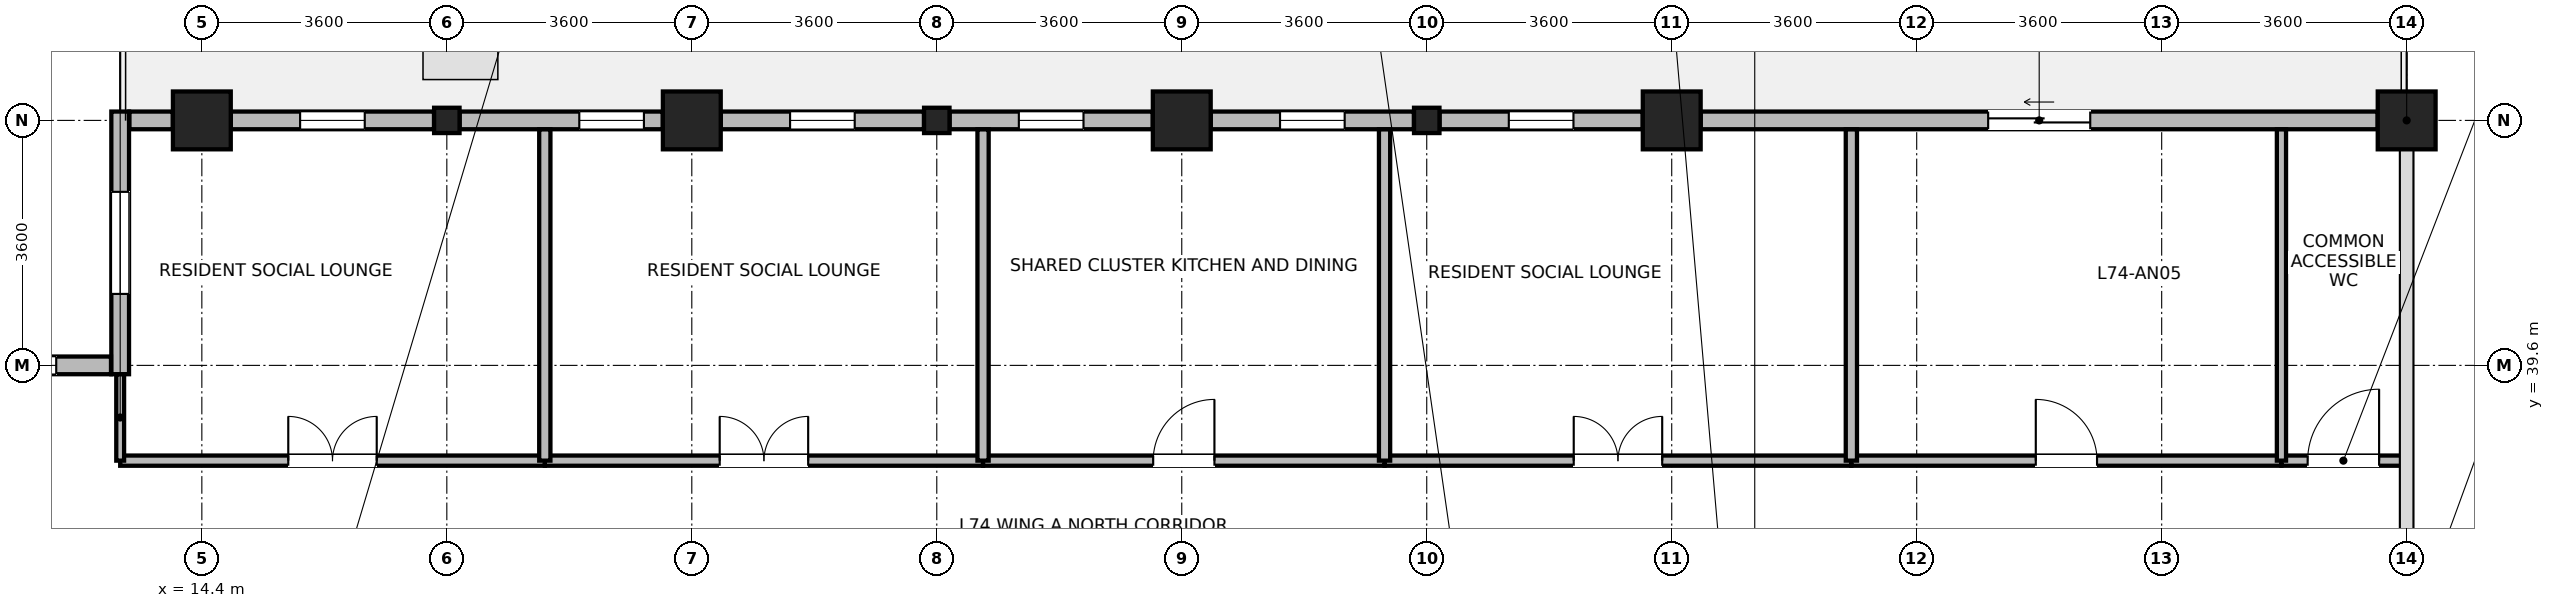
"""IFC4 building model, lengths in metres.
Left out: names, types, materials, properties, quantities, classifications, styles, units other than length and angle.
Written with IfcOpenShell. Run it as: python <this file> out.ifc"""

import sys

from ifc_helpers import new_model, si_unit, direction, frame, frame_2d, origin, origin_2d, place, context, subcontext, project, spatial, rectangle, i_section, extrude, source, transform, mapped, element, fill, save


model = new_model("IFC4")
c1 = context("Model", 3, precision=1e-05, world=origin(), true_north=direction((0.0, 1.0)))
c2 = subcontext(c1, "Body", "Model", "MODEL_VIEW")
j1 = project(units=[si_unit("LENGTHUNIT", "METRE"), si_unit("PLANEANGLEUNIT", "RADIAN")], contexts=[c1])
p1 = place(None, origin())
s1 = spatial("IfcSite", under=j1, at=p1, CompositionType="ELEMENT")
p2 = place(p1, origin())
s2 = spatial("IfcBuilding", under=s1, at=p2, CompositionType="ELEMENT")
p3 = place(p2, frame((0.0, 0.0, 286.9)))
s3 = spatial("IfcBuildingStorey", under=s2, at=p3, CompositionType="ELEMENT", Elevation=286.9)
m1 = source(origin(), c2, "Body", "SweptSolid", [
    extrude(rectangle(XDim=0.85, YDim=0.85, at=origin_2d()), origin(), (0.0, 0.0, 1.0), 3.7),
])
for number, where, z_axis, x_axis in (
    (1, (14.4, 43.2, 0.0), (0.0, 0.0, 1.0), (1.0, 0.0, 0.0)),
    (2, (21.6, 43.2, 0.0), (0.0, 0.0, 1.0), (1.0, 0.0, 0.0)),
    (3, (28.8, 43.2, 0.0), (0.0, 0.0, 1.0), (1.0, 0.0, 0.0)),
    (4, (36.0, 43.2, 0.0), (0.0, 0.0, 1.0), (1.0, 0.0, 0.0)),
    (5, (46.8, 43.2, 0.0), (0.0, 0.0, 1.0), (1.0, 0.0, 0.0)),
):
    element("IfcColumn", number, at=place(p3, frame(where, z_axis=z_axis, x_axis=x_axis)), inside=s3, PredefinedType="COLUMN", context=c2, shape_type="MappedRepresentation", body=[
        mapped(m1, transform((0.0, 0.0, 0.0), x_axis=(1.0, 0.0, 0.0), y_axis=(0.0, 1.0, 0.0), z_axis=(0.0, 0.0, 1.0), scale=1.0)),
    ])
m2 = source(origin(), c2, "Body", "SweptSolid", [
    extrude(i_section(OverallWidth=0.374, OverallDepth=0.372, WebThickness=0.015, FlangeThickness=0.026, FilletRadius=0.015, at=origin_2d()), origin(), (0.0, 0.0, 1.0), 3.7),
])
for number, where, z_axis, x_axis in (
    (6, (18.0, 43.2, 0.0), (0.0, 0.0, 1.0), (1.0, 0.0, 0.0)),
    (7, (25.2, 43.2, 0.0), (0.0, 0.0, 1.0), (1.0, 0.0, 0.0)),
    (8, (32.4, 43.2, 0.0), (0.0, 0.0, 1.0), (1.0, 0.0, 0.0)),
):
    element("IfcColumn", number, at=place(p3, frame(where, z_axis=z_axis, x_axis=x_axis)), inside=s3, PredefinedType="COLUMN", context=c2, shape_type="MappedRepresentation", body=[
        mapped(m2, transform((0.0, 0.0, 0.0), x_axis=(1.0, 0.0, 0.0), y_axis=(0.0, 1.0, 0.0), z_axis=(0.0, 0.0, 1.0), scale=1.0)),
    ])
p4 = place(p3, frame((36.426, 43.2, 0.0), z_axis=(0.0, 0.0, 1.0), x_axis=(1.0, 0.0, 0.0)))
e9 = element("IfcWall", 9, at=p4, inside=s3, PredefinedType="STANDARD", context=c2, shape_type="SweptSolid", body=[
    extrude(rectangle(XDim=9.948, YDim=0.26, at=frame_2d((4.974, 0.0))), origin(), (0.0, 0.0, 1.0), 3.055),
])
p5 = place(p4, frame((4.224, 0.0, 0.0)))
e10 = element("IfcOpeningElement", 10, at=p5, cuts=e9, PredefinedType="OPENING", context=c2, shape_type="SweptSolid", body=[
    extrude(rectangle(XDim=1.5, YDim=2.15, at=frame_2d((0.75, 1.075))), frame((0.0, 0.14, 0.0), z_axis=(0.0, -1.0, 0.0), x_axis=(1.0, 0.0, 0.0)), (0.0, 0.0, 1.0), 0.28),
])
p6 = place(p3, frame((32.588, 43.2, 0.0), z_axis=(0.0, 0.0, 1.0), x_axis=(1.0, 0.0, 0.0)))
e11 = element("IfcWall", 11, at=p6, inside=s3, PredefinedType="STANDARD", context=c2, shape_type="SweptSolid", body=[
    extrude(rectangle(XDim=2.986, YDim=0.26, at=frame_2d((1.493, 0.0))), origin(), (0.0, 0.0, 1.0), 3.055),
])
p7 = place(p6, frame((1.018, 0.0, 0.85)))
e12 = element("IfcOpeningElement", 12, at=p7, cuts=e11, PredefinedType="OPENING", context=c2, shape_type="SweptSolid", body=[
    extrude(rectangle(XDim=0.95, YDim=1.75, at=frame_2d((0.475, 0.875))), frame((0.0, 0.14, 0.0), z_axis=(0.0, -1.0, 0.0), x_axis=(1.0, 0.0, 0.0)), (0.0, 0.0, 1.0), 0.28),
])
p8 = place(p3, frame((29.226, 43.2, 0.0), z_axis=(0.0, 0.0, 1.0), x_axis=(1.0, 0.0, 0.0)))
e13 = element("IfcWall", 13, at=p8, inside=s3, PredefinedType="STANDARD", context=c2, shape_type="SweptSolid", body=[
    extrude(rectangle(XDim=2.986, YDim=0.26, at=frame_2d((1.493, 0.0))), origin(), (0.0, 0.0, 1.0), 3.055),
])
p9 = place(p8, frame((1.018, 0.0, 0.85)))
e14 = element("IfcOpeningElement", 14, at=p9, cuts=e13, PredefinedType="OPENING", context=c2, shape_type="SweptSolid", body=[
    extrude(rectangle(XDim=0.95, YDim=1.75, at=frame_2d((0.475, 0.875))), frame((0.0, 0.14, 0.0), z_axis=(0.0, -1.0, 0.0), x_axis=(1.0, 0.0, 0.0)), (0.0, 0.0, 1.0), 0.28),
])
p10 = place(p3, frame((25.388, 43.2, 0.0), z_axis=(0.0, 0.0, 1.0), x_axis=(1.0, 0.0, 0.0)))
e15 = element("IfcWall", 15, at=p10, inside=s3, PredefinedType="STANDARD", context=c2, shape_type="SweptSolid", body=[
    extrude(rectangle(XDim=2.986, YDim=0.26, at=frame_2d((1.493, 0.0))), origin(), (0.0, 0.0, 1.0), 3.055),
])
p11 = place(p10, frame((1.018, 0.0, 0.85)))
e16 = element("IfcOpeningElement", 16, at=p11, cuts=e15, PredefinedType="OPENING", context=c2, shape_type="SweptSolid", body=[
    extrude(rectangle(XDim=0.95, YDim=1.75, at=frame_2d((0.475, 0.875))), frame((0.0, 0.14, 0.0), z_axis=(0.0, -1.0, 0.0), x_axis=(1.0, 0.0, 0.0)), (0.0, 0.0, 1.0), 0.28),
])
p12 = place(p3, frame((22.026, 43.2, 0.0), z_axis=(0.0, 0.0, 1.0), x_axis=(1.0, 0.0, 0.0)))
e17 = element("IfcWall", 17, at=p12, inside=s3, PredefinedType="STANDARD", context=c2, shape_type="SweptSolid", body=[
    extrude(rectangle(XDim=2.986, YDim=0.26, at=frame_2d((1.493, 0.0))), origin(), (0.0, 0.0, 1.0), 3.055),
])
p13 = place(p12, frame((1.018, 0.0, 0.85)))
e18 = element("IfcOpeningElement", 18, at=p13, cuts=e17, PredefinedType="OPENING", context=c2, shape_type="SweptSolid", body=[
    extrude(rectangle(XDim=0.95, YDim=1.75, at=frame_2d((0.475, 0.875))), frame((0.0, 0.14, 0.0), z_axis=(0.0, -1.0, 0.0), x_axis=(1.0, 0.0, 0.0)), (0.0, 0.0, 1.0), 0.28),
])
p14 = place(p3, frame((18.188, 43.2, 0.0), z_axis=(0.0, 0.0, 1.0), x_axis=(1.0, 0.0, 0.0)))
e19 = element("IfcWall", 19, at=p14, inside=s3, PredefinedType="STANDARD", context=c2, shape_type="SweptSolid", body=[
    extrude(rectangle(XDim=2.986, YDim=0.26, at=frame_2d((1.493, 0.0))), origin(), (0.0, 0.0, 1.0), 3.055),
])
p15 = place(p14, frame((1.759, 0.0, 0.85)))
e20 = element("IfcOpeningElement", 20, at=p15, cuts=e19, PredefinedType="OPENING", context=c2, shape_type="SweptSolid", body=[
    extrude(rectangle(XDim=0.95, YDim=1.75, at=frame_2d((0.475, 0.875))), frame((0.0, 0.14, 0.0), z_axis=(0.0, -1.0, 0.0), x_axis=(1.0, 0.0, 0.0)), (0.0, 0.0, 1.0), 0.28),
])
p16 = place(p3, frame((14.826, 43.2, 0.0), z_axis=(0.0, 0.0, 1.0), x_axis=(1.0, 0.0, 0.0)))
e21 = element("IfcWall", 21, at=p16, inside=s3, PredefinedType="STANDARD", context=c2, shape_type="SweptSolid", body=[
    extrude(rectangle(XDim=2.986, YDim=0.26, at=frame_2d((1.493, 0.0))), origin(), (0.0, 0.0, 1.0), 3.055),
])
p17 = place(p16, frame((1.018, 0.0, 0.85)))
e22 = element("IfcOpeningElement", 22, at=p17, cuts=e21, PredefinedType="OPENING", context=c2, shape_type="SweptSolid", body=[
    extrude(rectangle(XDim=0.95, YDim=1.75, at=frame_2d((0.475, 0.875))), frame((0.0, 0.14, 0.0), z_axis=(0.0, -1.0, 0.0), x_axis=(1.0, 0.0, 0.0)), (0.0, 0.0, 1.0), 0.28),
])
p18 = place(p3, frame((13.335, 43.2, 0.0), z_axis=(0.0, 0.0, 1.0), x_axis=(1.0, 0.0, 0.0)))
e23 = element("IfcWall", 23, at=p18, inside=s3, PredefinedType="STANDARD", context=c2, shape_type="SweptSolid", body=[
    extrude(rectangle(XDim=0.639, YDim=0.26, at=frame_2d((0.32, 0.0))), origin(), (0.0, 0.0, 1.0), 3.455),
])
p19 = place(p3, frame((13.2, 39.47, 0.0), z_axis=(0.0, 0.0, 1.0), x_axis=(0.0, 1.0, 0.0)))
e24 = element("IfcWall", 24, at=p19, inside=s3, PredefinedType="STANDARD", context=c2, shape_type="SweptSolid", body=[
    extrude(rectangle(XDim=3.86, YDim=0.26, at=frame_2d((1.93, 0.0))), origin(), (0.0, 0.0, 1.0), 3.455),
])
p20 = place(p19, frame((1.18, 0.0, 0.85)))
e25 = element("IfcOpeningElement", 25, at=p20, cuts=e24, PredefinedType="OPENING", context=c2, shape_type="SweptSolid", body=[
    extrude(rectangle(XDim=1.5, YDim=1.85, at=frame_2d((0.75, 0.925))), frame((0.0, 0.14, 0.0), z_axis=(0.0, -1.0, 0.0), x_axis=(1.0, 0.0, 0.0)), (0.0, 0.0, 1.0), 0.28),
])
p21 = place(p3, frame((3.735, 39.6, 0.0), z_axis=(0.0, 0.0, 1.0), x_axis=(1.0, 0.0, 0.0)))
e26 = element("IfcWall", 26, at=p21, inside=s3, PredefinedType="STANDARD", context=c2, shape_type="SweptSolid", body=[
    extrude(rectangle(XDim=9.33, YDim=0.26, at=frame_2d((4.665, 0.0))), origin(), (0.0, 0.0, 1.0), 3.455),
])
p22 = place(p21, frame((0.805, 0.0, 0.85)))
e27 = element("IfcOpeningElement", 27, at=p22, cuts=e26, PredefinedType="OPENING", context=c2, shape_type="SweptSolid", body=[
    extrude(rectangle(XDim=1.5, YDim=1.85, at=frame_2d((0.75, 0.925))), frame((0.0, 0.14, 0.0), z_axis=(0.0, -1.0, 0.0), x_axis=(1.0, 0.0, 0.0)), (0.0, 0.0, 1.0), 0.28),
])
p23 = place(p21, frame((3.915, 0.0, 0.85)))
e28 = element("IfcOpeningElement", 28, at=p23, cuts=e26, PredefinedType="OPENING", context=c2, shape_type="SweptSolid", body=[
    extrude(rectangle(XDim=1.5, YDim=1.85, at=frame_2d((0.75, 0.925))), frame((0.0, 0.14, 0.0), z_axis=(0.0, -1.0, 0.0), x_axis=(1.0, 0.0, 0.0)), (0.0, 0.0, 1.0), 0.28),
])
p24 = place(p21, frame((7.025, 0.0, 0.85)))
e29 = element("IfcOpeningElement", 29, at=p24, cuts=e26, PredefinedType="OPENING", context=c2, shape_type="SweptSolid", body=[
    extrude(rectangle(XDim=1.5, YDim=1.85, at=frame_2d((0.75, 0.925))), frame((0.0, 0.14, 0.0), z_axis=(0.0, -1.0, 0.0), x_axis=(1.0, 0.0, 0.0)), (0.0, 0.0, 1.0), 0.28),
])
p25 = place(p3, frame((31.78, 38.2, 0.0), z_axis=(0.0, 0.0, 1.0), x_axis=(1.0, 0.0, 0.0)))
e30 = element("IfcWall", 30, at=p25, inside=s3, PredefinedType="PARTITIONING", context=c2, shape_type="SweptSolid", body=[
    extrude(rectangle(XDim=6.86, YDim=0.15, at=frame_2d((3.43, 0.0))), origin(), (0.0, 0.0, 1.0), 3.455),
])
p26 = place(p25, frame((2.78, 0.0, 0.0)))
e31 = element("IfcOpeningElement", 31, at=p26, cuts=e30, PredefinedType="OPENING", context=c2, shape_type="SweptSolid", body=[
    extrude(rectangle(XDim=1.3, YDim=2.12, at=frame_2d((0.65, 1.06))), frame((0.0, 0.085, 0.0), z_axis=(0.0, -1.0, 0.0), x_axis=(1.0, 0.0, 0.0)), (0.0, 0.0, 1.0), 0.17),
])
p27 = place(p3, frame((19.44, 38.2, 0.0), z_axis=(0.0, 0.0, 1.0), x_axis=(1.0, 0.0, 0.0)))
e32 = element("IfcWall", 32, at=p27, inside=s3, PredefinedType="PARTITIONING", context=c2, shape_type="SweptSolid", body=[
    extrude(rectangle(XDim=6.44, YDim=0.15, at=frame_2d((3.22, 0.0))), origin(), (0.0, 0.0, 1.0), 3.455),
])
p28 = place(p27, frame((2.57, 0.0, 0.0)))
e33 = element("IfcOpeningElement", 33, at=p28, cuts=e32, PredefinedType="OPENING", context=c2, shape_type="SweptSolid", body=[
    extrude(rectangle(XDim=1.3, YDim=2.12, at=frame_2d((0.65, 1.06))), frame((0.0, 0.085, 0.0), z_axis=(0.0, -1.0, 0.0), x_axis=(1.0, 0.0, 0.0)), (0.0, 0.0, 1.0), 0.17),
])
p29 = place(p3, frame((38.64, 38.2, 0.0), z_axis=(0.0, 0.0, 1.0), x_axis=(1.0, 0.0, 0.0)))
e34 = element("IfcWall", 34, at=p29, inside=s3, PredefinedType="PARTITIONING", context=c2, shape_type="SweptSolid", body=[
    extrude(rectangle(XDim=6.32, YDim=0.15, at=frame_2d((3.16, 0.0))), origin(), (0.0, 0.0, 1.0), 3.455),
])
p30 = place(p29, frame((2.71, 0.0, 0.0)))
e35 = element("IfcOpeningElement", 35, at=p30, cuts=e34, PredefinedType="OPENING", context=c2, shape_type="SweptSolid", body=[
    extrude(rectangle(XDim=0.9, YDim=2.08, at=frame_2d((0.45, 1.04))), frame((0.0, 0.085, 0.0), z_axis=(0.0, -1.0, 0.0), x_axis=(1.0, 0.0, 0.0)), (0.0, 0.0, 1.0), 0.17),
])
p31 = place(p3, frame((13.2, 38.2, 0.0), z_axis=(0.0, 0.0, 1.0), x_axis=(1.0, 0.0, 0.0)))
e36 = element("IfcWall", 36, at=p31, inside=s3, PredefinedType="PARTITIONING", context=c2, shape_type="SweptSolid", body=[
    extrude(rectangle(XDim=6.24, YDim=0.15, at=frame_2d((3.12, 0.0))), origin(), (0.0, 0.0, 1.0), 3.455),
])
p32 = place(p31, frame((2.47, 0.0, 0.0)))
e37 = element("IfcOpeningElement", 37, at=p32, cuts=e36, PredefinedType="OPENING", context=c2, shape_type="SweptSolid", body=[
    extrude(rectangle(XDim=1.3, YDim=2.12, at=frame_2d((0.65, 1.06))), frame((0.0, 0.085, 0.0), z_axis=(0.0, -1.0, 0.0), x_axis=(1.0, 0.0, 0.0)), (0.0, 0.0, 1.0), 0.17),
])
p33 = place(p3, frame((25.88, 38.2, 0.0), z_axis=(0.0, 0.0, 1.0), x_axis=(1.0, 0.0, 0.0)))
e38 = element("IfcWall", 38, at=p33, inside=s3, PredefinedType="PARTITIONING", context=c2, shape_type="SweptSolid", body=[
    extrude(rectangle(XDim=5.9, YDim=0.15, at=frame_2d((2.95, 0.0))), origin(), (0.0, 0.0, 1.0), 3.455),
])
p34 = place(p33, frame((2.5, 0.0, 0.0)))
e39 = element("IfcOpeningElement", 39, at=p34, cuts=e38, PredefinedType="OPENING", context=c2, shape_type="SweptSolid", body=[
    extrude(rectangle(XDim=0.9, YDim=2.08, at=frame_2d((0.45, 1.04))), frame((0.0, 0.085, 0.0), z_axis=(0.0, -1.0, 0.0), x_axis=(1.0, 0.0, 0.0)), (0.0, 0.0, 1.0), 0.17),
])
p35 = place(p3, frame((44.96, 38.2, 0.0), z_axis=(0.0, 0.0, 1.0), x_axis=(1.0, 0.0, 0.0)))
e40 = element("IfcWall", 40, at=p35, inside=s3, PredefinedType="PARTITIONING", context=c2, shape_type="SweptSolid", body=[
    extrude(rectangle(XDim=1.82, YDim=0.15, at=frame_2d((0.91, 0.0))), origin(), (0.0, 0.0, 1.0), 3.455),
])
p36 = place(p35, frame((0.385, 0.0, 0.0)))
e41 = element("IfcOpeningElement", 41, at=p36, cuts=e40, PredefinedType="OPENING", context=c2, shape_type="SweptSolid", body=[
    extrude(rectangle(XDim=1.05, YDim=2.12, at=frame_2d((0.525, 1.06))), frame((0.0, 0.085, 0.0), z_axis=(0.0, -1.0, 0.0), x_axis=(1.0, 0.0, 0.0)), (0.0, 0.0, 1.0), 0.17),
])
p37 = place(p3, frame((13.2, 38.2, 0.0), z_axis=(0.0, 0.0, 1.0), x_axis=(0.0, 1.0, 0.0)))
e42 = element("IfcWall", 42, at=p37, inside=s3, PredefinedType="PARTITIONING", context=c2, shape_type="SweptSolid", body=[
    extrude(rectangle(XDim=1.268, YDim=0.115, at=frame_2d((0.634, 0.0))), origin(), (0.0, 0.0, 1.0), 3.455),
])
for number, where, z_axis, x_axis in (
    (43, (19.44, 38.2, 0.0), (0.0, 0.0, 1.0), (0.0, 1.0, 0.0)),
    (44, (25.88, 38.2, 0.0), (0.0, 0.0, 1.0), (0.0, 1.0, 0.0)),
    (45, (31.78, 38.2, 0.0), (0.0, 0.0, 1.0), (0.0, 1.0, 0.0)),
    (46, (38.64, 38.2, 0.0), (0.0, 0.0, 1.0), (0.0, 1.0, 0.0)),
):
    element("IfcWall", number, at=place(p3, frame(where, z_axis=z_axis, x_axis=x_axis)), inside=s3, PredefinedType="PARTITIONING", context=c2, shape_type="SweptSolid", body=[
        extrude(rectangle(XDim=4.868, YDim=0.165, at=frame_2d((2.434, 0.0))), origin(), (0.0, 0.0, 1.0), 3.455),
    ])
p38 = place(p3, frame((44.96, 38.2, 0.0), z_axis=(0.0, 0.0, 1.0), x_axis=(0.0, 1.0, 0.0)))
e47 = element("IfcWall", 47, at=p38, inside=s3, PredefinedType="PARTITIONING", context=c2, shape_type="SweptSolid", body=[
    extrude(rectangle(XDim=4.868, YDim=0.135, at=frame_2d((2.434, 0.0))), origin(), (0.0, 0.0, 1.0), 3.455),
])
p39 = place(p5, origin())
e48 = element("IfcDoor", 48, at=p39, inside=s3, OperationType="SLIDING_TO_LEFT", PredefinedType="DOOR", context=c2, shape_type="SweptSolid", body=[
    extrude(rectangle(XDim=1.5, YDim=2.15, at=frame_2d((0.75, 1.075))), frame((0.0, 0.025, 0.0), z_axis=(0.0, -1.0, 0.0), x_axis=(1.0, 0.0, 0.0)), (0.0, 0.0, 1.0), 0.05),
])
fill(e10, e48)
p40 = place(p7, origin())
e49 = element("IfcWindow", 49, at=p40, inside=s3, PartitioningType="SINGLE_PANEL", PredefinedType="WINDOW", context=c2, shape_type="SweptSolid", body=[
    extrude(rectangle(XDim=0.95, YDim=1.75, at=frame_2d((0.475, 0.875))), frame((0.0, 0.03, 0.0), z_axis=(0.0, -1.0, 0.0), x_axis=(1.0, 0.0, 0.0)), (0.0, 0.0, 1.0), 0.06),
])
fill(e12, e49)
p41 = place(p9, origin())
e50 = element("IfcWindow", 50, at=p41, inside=s3, PartitioningType="SINGLE_PANEL", PredefinedType="WINDOW", context=c2, shape_type="SweptSolid", body=[
    extrude(rectangle(XDim=0.95, YDim=1.75, at=frame_2d((0.475, 0.875))), frame((0.0, 0.03, 0.0), z_axis=(0.0, -1.0, 0.0), x_axis=(1.0, 0.0, 0.0)), (0.0, 0.0, 1.0), 0.06),
])
fill(e14, e50)
p42 = place(p11, origin())
e51 = element("IfcWindow", 51, at=p42, inside=s3, PartitioningType="SINGLE_PANEL", PredefinedType="WINDOW", context=c2, shape_type="SweptSolid", body=[
    extrude(rectangle(XDim=0.95, YDim=1.75, at=frame_2d((0.475, 0.875))), frame((0.0, 0.03, 0.0), z_axis=(0.0, -1.0, 0.0), x_axis=(1.0, 0.0, 0.0)), (0.0, 0.0, 1.0), 0.06),
])
fill(e16, e51)
p43 = place(p13, origin())
e52 = element("IfcWindow", 52, at=p43, inside=s3, PartitioningType="SINGLE_PANEL", PredefinedType="WINDOW", context=c2, shape_type="SweptSolid", body=[
    extrude(rectangle(XDim=0.95, YDim=1.75, at=frame_2d((0.475, 0.875))), frame((0.0, 0.03, 0.0), z_axis=(0.0, -1.0, 0.0), x_axis=(1.0, 0.0, 0.0)), (0.0, 0.0, 1.0), 0.06),
])
fill(e18, e52)
p44 = place(p15, origin())
e53 = element("IfcWindow", 53, at=p44, inside=s3, PartitioningType="SINGLE_PANEL", PredefinedType="WINDOW", context=c2, shape_type="SweptSolid", body=[
    extrude(rectangle(XDim=0.95, YDim=1.75, at=frame_2d((0.475, 0.875))), frame((0.0, 0.03, 0.0), z_axis=(0.0, -1.0, 0.0), x_axis=(1.0, 0.0, 0.0)), (0.0, 0.0, 1.0), 0.06),
])
fill(e20, e53)
p45 = place(p17, origin())
e54 = element("IfcWindow", 54, at=p45, inside=s3, PartitioningType="SINGLE_PANEL", PredefinedType="WINDOW", context=c2, shape_type="SweptSolid", body=[
    extrude(rectangle(XDim=0.95, YDim=1.75, at=frame_2d((0.475, 0.875))), frame((0.0, 0.03, 0.0), z_axis=(0.0, -1.0, 0.0), x_axis=(1.0, 0.0, 0.0)), (0.0, 0.0, 1.0), 0.06),
])
fill(e22, e54)
p46 = place(p20, origin())
e55 = element("IfcWindow", 55, at=p46, inside=s3, PartitioningType="SINGLE_PANEL", PredefinedType="WINDOW", context=c2, shape_type="SweptSolid", body=[
    extrude(rectangle(XDim=1.5, YDim=1.85, at=frame_2d((0.75, 0.925))), frame((0.0, 0.03, 0.0), z_axis=(0.0, -1.0, 0.0), x_axis=(1.0, 0.0, 0.0)), (0.0, 0.0, 1.0), 0.06),
])
fill(e25, e55)
p47 = place(p24, origin())
e56 = element("IfcWindow", 56, at=p47, inside=s3, PartitioningType="SINGLE_PANEL", PredefinedType="WINDOW", context=c2, shape_type="SweptSolid", body=[
    extrude(rectangle(XDim=1.5, YDim=1.85, at=frame_2d((0.75, 0.925))), frame((0.0, 0.03, 0.0), z_axis=(0.0, -1.0, 0.0), x_axis=(1.0, 0.0, 0.0)), (0.0, 0.0, 1.0), 0.06),
])
fill(e29, e56)
p48 = place(p26, origin())
e57 = element("IfcDoor", 57, at=p48, inside=s3, OperationType="DOUBLE_DOOR_SINGLE_SWING", PredefinedType="DOOR", context=c2, shape_type="SweptSolid", body=[
    extrude(rectangle(XDim=1.3, YDim=2.12, at=frame_2d((0.65, 1.06))), frame((0.0, 0.025, 0.0), z_axis=(0.0, -1.0, 0.0), x_axis=(1.0, 0.0, 0.0)), (0.0, 0.0, 1.0), 0.05),
])
fill(e31, e57)
p49 = place(p28, origin())
e58 = element("IfcDoor", 58, at=p49, inside=s3, OperationType="DOUBLE_DOOR_SINGLE_SWING", PredefinedType="DOOR", context=c2, shape_type="SweptSolid", body=[
    extrude(rectangle(XDim=1.3, YDim=2.12, at=frame_2d((0.65, 1.06))), frame((0.0, 0.025, 0.0), z_axis=(0.0, -1.0, 0.0), x_axis=(1.0, 0.0, 0.0)), (0.0, 0.0, 1.0), 0.05),
])
fill(e33, e58)
p50 = place(p30, origin())
e59 = element("IfcDoor", 59, at=p50, inside=s3, OperationType="SINGLE_SWING_LEFT", PredefinedType="DOOR", context=c2, shape_type="SweptSolid", body=[
    extrude(rectangle(XDim=0.9, YDim=2.08, at=frame_2d((0.45, 1.04))), frame((0.0, 0.025, 0.0), z_axis=(0.0, -1.0, 0.0), x_axis=(1.0, 0.0, 0.0)), (0.0, 0.0, 1.0), 0.05),
])
fill(e35, e59)
p51 = place(p32, origin())
e60 = element("IfcDoor", 60, at=p51, inside=s3, OperationType="DOUBLE_DOOR_SINGLE_SWING", PredefinedType="DOOR", context=c2, shape_type="SweptSolid", body=[
    extrude(rectangle(XDim=1.3, YDim=2.12, at=frame_2d((0.65, 1.06))), frame((0.0, 0.025, 0.0), z_axis=(0.0, -1.0, 0.0), x_axis=(1.0, 0.0, 0.0)), (0.0, 0.0, 1.0), 0.05),
])
fill(e37, e60)
p52 = place(p34, origin())
e61 = element("IfcDoor", 61, at=p52, inside=s3, OperationType="SINGLE_SWING_RIGHT", PredefinedType="DOOR", context=c2, shape_type="SweptSolid", body=[
    extrude(rectangle(XDim=0.9, YDim=2.08, at=frame_2d((0.45, 1.04))), frame((0.0, 0.025, 0.0), z_axis=(0.0, -1.0, 0.0), x_axis=(1.0, 0.0, 0.0)), (0.0, 0.0, 1.0), 0.05),
])
fill(e39, e61)
p53 = place(p36, origin())
e62 = element("IfcDoor", 62, at=p53, inside=s3, OperationType="SINGLE_SWING_RIGHT", PredefinedType="DOOR", context=c2, shape_type="SweptSolid", body=[
    extrude(rectangle(XDim=1.05, YDim=2.12, at=frame_2d((0.525, 1.06))), frame((0.0, 0.025, 0.0), z_axis=(0.0, -1.0, 0.0), x_axis=(1.0, 0.0, 0.0)), (0.0, 0.0, 1.0), 0.05),
])
fill(e41, e62)
save(model, sys.argv[1])
